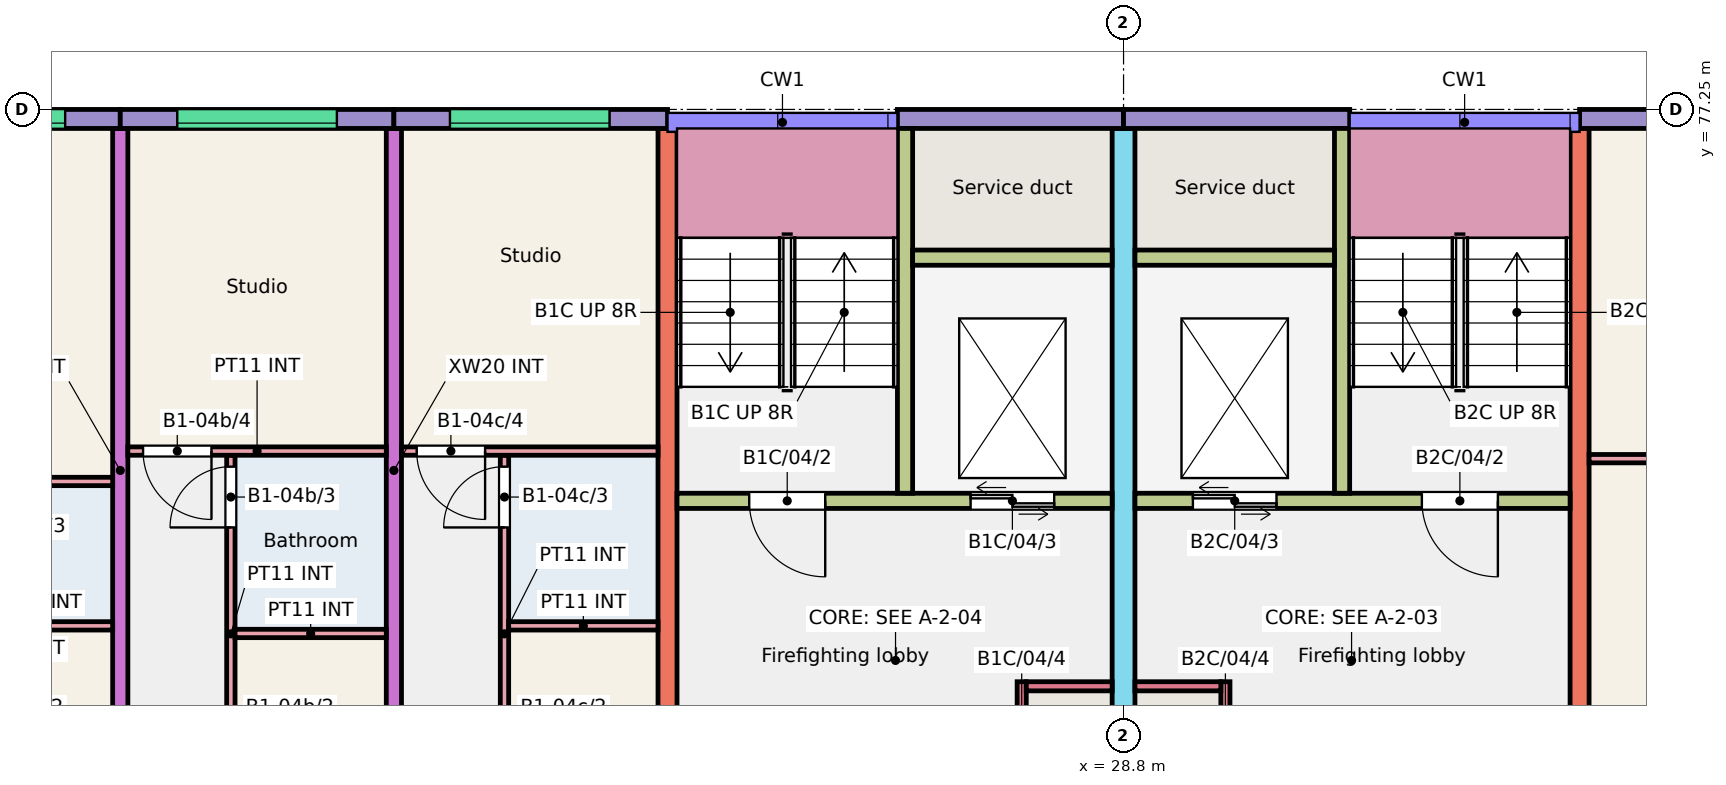
"""IFC4 building model, lengths in metres.
Left out: names, types, materials, properties, quantities, classifications, styles, units other than length and angle.
Written with IfcOpenShell. Run it as: python <this file> out.ifc"""

import sys

from ifc_helpers import new_model, si_unit, direction, frame, frame_2d, origin, place, context, subcontext, project, spatial, rectangle, extrude, element, fill, save


model = new_model("IFC4")
c1 = context("Model", 3, precision=1e-05, world=origin(), true_north=direction((0.0, 1.0)))
c2 = subcontext(c1, "Body", "Model", "MODEL_VIEW")
j1 = project(units=[si_unit("LENGTHUNIT", "METRE"), si_unit("PLANEANGLEUNIT", "RADIAN")], contexts=[c1])
p1 = place(None, origin())
s1 = spatial("IfcSite", under=j1, at=p1, CompositionType="ELEMENT")
p2 = place(p1, origin())
s2 = spatial("IfcBuilding", under=s1, at=p2, CompositionType="ELEMENT")
p3 = place(p2, frame((0.0, 0.0, 12.0)))
s3 = spatial("IfcBuildingStorey", under=s2, at=p3, CompositionType="ELEMENT", Elevation=12.0)
for number, where, z_axis, x_axis in (
    (1, (15.6, 68.0, 0.0), (0.0, 0.0, 1.0), (0.0, 1.0, 0.0)),
    (2, (19.2, 68.0, 0.0), (0.0, 0.0, 1.0), (0.0, 1.0, 0.0)),
):
    element("IfcWall", number, at=place(p3, frame(where, z_axis=z_axis, x_axis=x_axis)), inside=s3, PredefinedType="SHEAR", context=c2, shape_type="SweptSolid", body=[
        extrude(rectangle(XDim=9.0, YDim=0.2, at=frame_2d((4.5, 0.0))), origin(), (0.0, 0.0, 1.0), 3.0),
    ])
p4 = place(p3, frame((22.8, 68.0, 0.0), z_axis=(0.0, 0.0, 1.0), x_axis=(0.0, 1.0, 0.0)))
e3 = element("IfcWall", 3, at=p4, inside=s3, PredefinedType="SHEAR", context=c2, shape_type="SweptSolid", body=[
    extrude(rectangle(XDim=9.0, YDim=0.25, at=frame_2d((4.5, 0.0))), origin(), (0.0, 0.0, 1.0), 3.0),
])
p5 = place(p3, frame((28.8, 66.0, 0.0), z_axis=(0.0, 0.0, 1.0), x_axis=(0.0, 1.0, 0.0)))
e4 = element("IfcWall", 4, at=p5, inside=s3, PredefinedType="SHEAR", context=c2, shape_type="SweptSolid", body=[
    extrude(rectangle(XDim=11.0, YDim=0.3, at=frame_2d((5.5, 0.0))), origin(), (0.0, 0.0, 1.0), 3.0),
])
p6 = place(p5, frame((0.3, 0.0, 0.0)))
e5 = element("IfcOpeningElement", 5, at=p6, cuts=e4, PredefinedType="OPENING", context=c2, shape_type="SweptSolid", body=[
    extrude(rectangle(XDim=1.2, YDim=2.1, at=frame_2d((0.6, 1.05))), frame((0.0, 0.16, 0.0), z_axis=(0.0, -1.0, 0.0), x_axis=(1.0, 0.0, 0.0)), (0.0, 0.0, 1.0), 0.32),
])
p7 = place(p3, frame((34.8, 68.0, 0.0), z_axis=(0.0, 0.0, 1.0), x_axis=(0.0, 1.0, 0.0)))
e6 = element("IfcWall", 6, at=p7, inside=s3, PredefinedType="SHEAR", context=c2, shape_type="SweptSolid", body=[
    extrude(rectangle(XDim=9.0, YDim=0.25, at=frame_2d((4.5, 0.0))), origin(), (0.0, 0.0, 1.0), 3.0),
])
p8 = place(p3, frame((11.85, 77.125, 0.0), z_axis=(0.0, 0.0, 1.0), x_axis=(1.0, 0.0, 0.0)))
e7 = element("IfcWall", 7, at=p8, inside=s3, PredefinedType="SOLIDWALL", context=c2, shape_type="SweptSolid", body=[
    extrude(rectangle(XDim=3.75, YDim=0.25, at=frame_2d((1.875, 0.0))), origin(), (0.0, 0.0, 1.0), 3.0),
])
p9 = place(p8, frame((0.925, 0.0, 1.2)))
e8 = element("IfcOpeningElement", 8, at=p9, cuts=e7, PredefinedType="OPENING", context=c2, shape_type="SweptSolid", body=[
    extrude(rectangle(XDim=2.1, YDim=1.2, at=frame_2d((1.05, 0.6))), frame((0.0, 0.135, 0.0), z_axis=(0.0, -1.0, 0.0), x_axis=(1.0, 0.0, 0.0)), (0.0, 0.0, 1.0), 0.27),
])
p10 = place(p3, frame((15.6, 77.125, 0.0), z_axis=(0.0, 0.0, 1.0), x_axis=(1.0, 0.0, 0.0)))
e9 = element("IfcWall", 9, at=p10, inside=s3, PredefinedType="SOLIDWALL", context=c2, shape_type="SweptSolid", body=[
    extrude(rectangle(XDim=3.6, YDim=0.25, at=frame_2d((1.8, 0.0))), origin(), (0.0, 0.0, 1.0), 3.0),
])
p11 = place(p10, frame((0.75, 0.0, 1.2)))
e10 = element("IfcOpeningElement", 10, at=p11, cuts=e9, PredefinedType="OPENING", context=c2, shape_type="SweptSolid", body=[
    extrude(rectangle(XDim=2.1, YDim=1.2, at=frame_2d((1.05, 0.6))), frame((0.0, 0.135, 0.0), z_axis=(0.0, -1.0, 0.0), x_axis=(1.0, 0.0, 0.0)), (0.0, 0.0, 1.0), 0.27),
])
p12 = place(p3, frame((19.2, 77.125, 0.0), z_axis=(0.0, 0.0, 1.0), x_axis=(1.0, 0.0, 0.0)))
e11 = element("IfcWall", 11, at=p12, inside=s3, PredefinedType="SOLIDWALL", context=c2, shape_type="SweptSolid", body=[
    extrude(rectangle(XDim=3.6, YDim=0.25, at=frame_2d((1.8, 0.0))), origin(), (0.0, 0.0, 1.0), 3.0),
])
p13 = place(p12, frame((0.738, 0.0, 1.2)))
e12 = element("IfcOpeningElement", 12, at=p13, cuts=e11, PredefinedType="OPENING", context=c2, shape_type="SweptSolid", body=[
    extrude(rectangle(XDim=2.1, YDim=1.2, at=frame_2d((1.05, 0.6))), frame((0.0, 0.135, 0.0), z_axis=(0.0, -1.0, 0.0), x_axis=(1.0, 0.0, 0.0)), (0.0, 0.0, 1.0), 0.27),
])
p14 = place(p3, frame((25.825, 77.125, 0.0), z_axis=(0.0, 0.0, 1.0), x_axis=(1.0, 0.0, 0.0)))
e13 = element("IfcWall", 13, at=p14, inside=s3, PredefinedType="SOLIDWALL", context=c2, shape_type="SweptSolid", body=[
    extrude(rectangle(XDim=2.975, YDim=0.25, at=frame_2d((1.488, 0.0))), origin(), (0.0, 0.0, 1.0), 3.0),
])
p15 = place(p3, frame((22.925, 72.1, 0.0), z_axis=(0.0, 0.0, 1.0), x_axis=(1.0, 0.0, 0.0)))
e14 = element("IfcWall", 14, at=p15, inside=s3, PredefinedType="SHEAR", context=c2, shape_type="SweptSolid", body=[
    extrude(rectangle(XDim=5.725, YDim=0.2, at=frame_2d((2.862, 0.0))), origin(), (0.0, 0.0, 1.0), 3.0),
])
p16 = place(p15, frame((0.95, 0.0, 0.0)))
e15 = element("IfcOpeningElement", 15, at=p16, cuts=e14, PredefinedType="OPENING", context=c2, shape_type="SweptSolid", body=[
    extrude(rectangle(XDim=1.0, YDim=2.1, at=frame_2d((0.5, 1.05))), frame((0.0, 0.11, 0.0), z_axis=(0.0, -1.0, 0.0), x_axis=(1.0, 0.0, 0.0)), (0.0, 0.0, 1.0), 0.22),
])
p17 = place(p15, frame((3.863, 0.0, 0.0)))
e16 = element("IfcOpeningElement", 16, at=p17, cuts=e14, PredefinedType="OPENING", context=c2, shape_type="SweptSolid", body=[
    extrude(rectangle(XDim=1.1, YDim=2.1, at=frame_2d((0.55, 1.05))), frame((0.0, 0.11, 0.0), z_axis=(0.0, -1.0, 0.0), x_axis=(1.0, 0.0, 0.0)), (0.0, 0.0, 1.0), 0.22),
])
p18 = place(p3, frame((25.925, 72.2, 0.0), z_axis=(0.0, 0.0, 1.0), x_axis=(0.0, 1.0, 0.0)))
e17 = element("IfcWall", 17, at=p18, inside=s3, PredefinedType="SHEAR", context=c2, shape_type="SweptSolid", body=[
    extrude(rectangle(XDim=4.8, YDim=0.2, at=frame_2d((2.4, 0.0))), origin(), (0.0, 0.0, 1.0), 3.0),
])
p19 = place(p3, frame((26.025, 75.3, 0.0), z_axis=(0.0, 0.0, 1.0), x_axis=(1.0, 0.0, 0.0)))
e18 = element("IfcWall", 18, at=p19, inside=s3, PredefinedType="SHEAR", context=c2, shape_type="SweptSolid", body=[
    extrude(rectangle(XDim=2.625, YDim=0.2, at=frame_2d((1.312, 0.0))), origin(), (0.0, 0.0, 1.0), 3.0),
])
p20 = place(p3, frame((27.46, 68.0, 0.0), z_axis=(0.0, 0.0, 1.0), x_axis=(0.0, 1.0, 0.0)))
e19 = element("IfcWall", 19, at=p20, inside=s3, PredefinedType="SHEAR", context=c2, shape_type="SweptSolid", body=[
    extrude(rectangle(XDim=1.72, YDim=0.12, at=frame_2d((0.86, 0.0))), origin(), (0.0, 0.0, 1.0), 3.0),
])
p21 = place(p20, frame((0.45, 0.0, 0.0)))
e20 = element("IfcOpeningElement", 20, at=p21, cuts=e19, PredefinedType="OPENING", context=c2, shape_type="SweptSolid", body=[
    extrude(rectangle(XDim=0.9, YDim=2.1, at=frame_2d((0.45, 1.05))), frame((0.0, 0.07, 0.0), z_axis=(0.0, -1.0, 0.0), x_axis=(1.0, 0.0, 0.0)), (0.0, 0.0, 1.0), 0.14),
])
p22 = place(p3, frame((27.52, 69.66, 0.0), z_axis=(0.0, 0.0, 1.0), x_axis=(1.0, 0.0, 0.0)))
e21 = element("IfcWall", 21, at=p22, inside=s3, PredefinedType="SHEAR", context=c2, shape_type="SweptSolid", body=[
    extrude(rectangle(XDim=1.13, YDim=0.12, at=frame_2d((0.565, 0.0))), origin(), (0.0, 0.0, 1.0), 3.0),
])
p23 = place(p3, frame((28.8, 77.125, 0.0), z_axis=(0.0, 0.0, 1.0), x_axis=(1.0, 0.0, 0.0)))
e22 = element("IfcWall", 22, at=p23, inside=s3, PredefinedType="SOLIDWALL", context=c2, shape_type="SweptSolid", body=[
    extrude(rectangle(XDim=2.975, YDim=0.25, at=frame_2d((1.487, 0.0))), origin(), (0.0, 0.0, 1.0), 3.0),
])
p24 = place(p3, frame((28.95, 72.1, 0.0), z_axis=(0.0, 0.0, 1.0), x_axis=(1.0, 0.0, 0.0)))
e23 = element("IfcWall", 23, at=p24, inside=s3, PredefinedType="SHEAR", context=c2, shape_type="SweptSolid", body=[
    extrude(rectangle(XDim=5.725, YDim=0.2, at=frame_2d((2.863, 0.0))), origin(), (0.0, 0.0, 1.0), 3.0),
])
p25 = place(p24, frame((3.775, 0.0, 0.0)))
e24 = element("IfcOpeningElement", 24, at=p25, cuts=e23, PredefinedType="OPENING", context=c2, shape_type="SweptSolid", body=[
    extrude(rectangle(XDim=1.0, YDim=2.1, at=frame_2d((0.5, 1.05))), frame((0.0, 0.11, 0.0), z_axis=(0.0, -1.0, 0.0), x_axis=(1.0, 0.0, 0.0)), (0.0, 0.0, 1.0), 0.22),
])
p26 = place(p24, frame((0.762, 0.0, 0.0)))
e25 = element("IfcOpeningElement", 25, at=p26, cuts=e23, PredefinedType="OPENING", context=c2, shape_type="SweptSolid", body=[
    extrude(rectangle(XDim=1.1, YDim=2.1, at=frame_2d((0.55, 1.05))), frame((0.0, 0.11, 0.0), z_axis=(0.0, -1.0, 0.0), x_axis=(1.0, 0.0, 0.0)), (0.0, 0.0, 1.0), 0.22),
])
p27 = place(p3, frame((31.675, 72.2, 0.0), z_axis=(0.0, 0.0, 1.0), x_axis=(0.0, 1.0, 0.0)))
e26 = element("IfcWall", 26, at=p27, inside=s3, PredefinedType="SHEAR", context=c2, shape_type="SweptSolid", body=[
    extrude(rectangle(XDim=4.8, YDim=0.2, at=frame_2d((2.4, 0.0))), origin(), (0.0, 0.0, 1.0), 3.0),
])
p28 = place(p3, frame((28.95, 75.3, 0.0), z_axis=(0.0, 0.0, 1.0), x_axis=(1.0, 0.0, 0.0)))
e27 = element("IfcWall", 27, at=p28, inside=s3, PredefinedType="SHEAR", context=c2, shape_type="SweptSolid", body=[
    extrude(rectangle(XDim=2.625, YDim=0.2, at=frame_2d((1.312, 0.0))), origin(), (0.0, 0.0, 1.0), 3.0),
])
p29 = place(p3, frame((30.14, 68.0, 0.0), z_axis=(0.0, 0.0, 1.0), x_axis=(0.0, 1.0, 0.0)))
e28 = element("IfcWall", 28, at=p29, inside=s3, PredefinedType="SHEAR", context=c2, shape_type="SweptSolid", body=[
    extrude(rectangle(XDim=1.72, YDim=0.12, at=frame_2d((0.86, 0.0))), origin(), (0.0, 0.0, 1.0), 3.0),
])
p30 = place(p29, frame((0.45, 0.0, 0.0)))
e29 = element("IfcOpeningElement", 29, at=p30, cuts=e28, PredefinedType="OPENING", context=c2, shape_type="SweptSolid", body=[
    extrude(rectangle(XDim=0.9, YDim=2.1, at=frame_2d((0.45, 1.05))), frame((0.0, 0.07, 0.0), z_axis=(0.0, -1.0, 0.0), x_axis=(1.0, 0.0, 0.0)), (0.0, 0.0, 1.0), 0.14),
])
p31 = place(p3, frame((28.95, 69.66, 0.0), z_axis=(0.0, 0.0, 1.0), x_axis=(1.0, 0.0, 0.0)))
e30 = element("IfcWall", 30, at=p31, inside=s3, PredefinedType="SHEAR", context=c2, shape_type="SweptSolid", body=[
    extrude(rectangle(XDim=1.13, YDim=0.12, at=frame_2d((0.565, 0.0))), origin(), (0.0, 0.0, 1.0), 3.0),
])
p32 = place(p3, frame((34.8, 77.125, 0.0), z_axis=(0.0, 0.0, 1.0), x_axis=(1.0, 0.0, 0.0)))
e31 = element("IfcWall", 31, at=p32, inside=s3, PredefinedType="SOLIDWALL", context=c2, shape_type="SweptSolid", body=[
    extrude(rectangle(XDim=3.6, YDim=0.25, at=frame_2d((1.8, 0.0))), origin(), (0.0, 0.0, 1.0), 3.0),
])
p33 = place(p32, frame((1.212, 0.0, 1.1)))
e32 = element("IfcOpeningElement", 32, at=p33, cuts=e31, PredefinedType="OPENING", context=c2, shape_type="SweptSolid", body=[
    extrude(rectangle(XDim=1.2, YDim=1.3, at=frame_2d((0.6, 0.65))), frame((0.0, 0.135, 0.0), z_axis=(0.0, -1.0, 0.0), x_axis=(1.0, 0.0, 0.0)), (0.0, 0.0, 1.0), 0.27),
])
p34 = place(p3, frame((13.56, 70.455, 0.0), z_axis=(0.0, 0.0, 1.0), x_axis=(1.0, 0.0, 0.0)))
e33 = element("IfcWall", 33, at=p34, inside=s3, PredefinedType="PARTITIONING", context=c2, shape_type="SweptSolid", body=[
    extrude(rectangle(XDim=1.94, YDim=0.11, at=frame_2d((0.97, 0.0))), origin(), (0.0, 0.0, 1.0), 2.8),
])
p35 = place(p3, frame((12.15, 72.355, 0.0), z_axis=(0.0, 0.0, 1.0), x_axis=(1.0, 0.0, 0.0)))
e34 = element("IfcWall", 34, at=p35, inside=s3, PredefinedType="PARTITIONING", context=c2, shape_type="SweptSolid", body=[
    extrude(rectangle(XDim=3.35, YDim=0.11, at=frame_2d((1.675, 0.0))), origin(), (0.0, 0.0, 1.0), 2.8),
])
p36 = place(p35, frame((0.2, 0.0, 0.0)))
e35 = element("IfcOpeningElement", 35, at=p36, cuts=e34, PredefinedType="OPENING", context=c2, shape_type="SweptSolid", body=[
    extrude(rectangle(XDim=0.9, YDim=2.1, at=frame_2d((0.45, 1.05))), frame((0.0, 0.065, 0.0), z_axis=(0.0, -1.0, 0.0), x_axis=(1.0, 0.0, 0.0)), (0.0, 0.0, 1.0), 0.13),
])
p37 = place(p3, frame((17.055, 68.0, 0.0), z_axis=(0.0, 0.0, 1.0), x_axis=(0.0, 1.0, 0.0)))
e36 = element("IfcWall", 36, at=p37, inside=s3, PredefinedType="PARTITIONING", context=c2, shape_type="SweptSolid", body=[
    extrude(rectangle(XDim=4.7, YDim=0.11, at=frame_2d((2.35, 0.0))), origin(), (0.0, 0.0, 1.0), 2.8),
])
p38 = place(p37, frame((0.2, 0.0, 0.0)))
e37 = element("IfcOpeningElement", 37, at=p38, cuts=e36, PredefinedType="OPENING", context=c2, shape_type="SweptSolid", body=[
    extrude(rectangle(XDim=0.8, YDim=2.1, at=frame_2d((0.4, 1.05))), frame((0.0, 0.065, 0.0), z_axis=(0.0, -1.0, 0.0), x_axis=(1.0, 0.0, 0.0)), (0.0, 0.0, 1.0), 0.13),
])
p39 = place(p37, frame((3.75, 0.0, 0.0)))
e38 = element("IfcOpeningElement", 38, at=p39, cuts=e36, PredefinedType="OPENING", context=c2, shape_type="SweptSolid", body=[
    extrude(rectangle(XDim=0.8, YDim=2.1, at=frame_2d((0.4, 1.05))), frame((0.0, 0.065, 0.0), z_axis=(0.0, -1.0, 0.0), x_axis=(1.0, 0.0, 0.0)), (0.0, 0.0, 1.0), 0.13),
])
p40 = place(p3, frame((17.11, 70.355, 0.0), z_axis=(0.0, 0.0, 1.0), x_axis=(1.0, 0.0, 0.0)))
e39 = element("IfcWall", 39, at=p40, inside=s3, PredefinedType="PARTITIONING", context=c2, shape_type="SweptSolid", body=[
    extrude(rectangle(XDim=1.99, YDim=0.11, at=frame_2d((0.995, 0.0))), origin(), (0.0, 0.0, 1.0), 2.8),
])
p41 = place(p3, frame((15.7, 72.755, 0.0), z_axis=(0.0, 0.0, 1.0), x_axis=(1.0, 0.0, 0.0)))
e40 = element("IfcWall", 40, at=p41, inside=s3, PredefinedType="PARTITIONING", context=c2, shape_type="SweptSolid", body=[
    extrude(rectangle(XDim=3.4, YDim=0.11, at=frame_2d((1.7, 0.0))), origin(), (0.0, 0.0, 1.0), 2.8),
])
p42 = place(p41, frame((0.2, 0.0, 0.0)))
e41 = element("IfcOpeningElement", 41, at=p42, cuts=e40, PredefinedType="OPENING", context=c2, shape_type="SweptSolid", body=[
    extrude(rectangle(XDim=0.9, YDim=2.1, at=frame_2d((0.45, 1.05))), frame((0.0, 0.065, 0.0), z_axis=(0.0, -1.0, 0.0), x_axis=(1.0, 0.0, 0.0)), (0.0, 0.0, 1.0), 0.13),
])
p43 = place(p3, frame((20.655, 68.0, 0.0), z_axis=(0.0, 0.0, 1.0), x_axis=(0.0, 1.0, 0.0)))
e42 = element("IfcWall", 42, at=p43, inside=s3, PredefinedType="PARTITIONING", context=c2, shape_type="SweptSolid", body=[
    extrude(rectangle(XDim=4.7, YDim=0.11, at=frame_2d((2.35, 0.0))), origin(), (0.0, 0.0, 1.0), 2.8),
])
p44 = place(p43, frame((0.2, 0.0, 0.0)))
e43 = element("IfcOpeningElement", 43, at=p44, cuts=e42, PredefinedType="OPENING", context=c2, shape_type="SweptSolid", body=[
    extrude(rectangle(XDim=0.8, YDim=2.1, at=frame_2d((0.4, 1.05))), frame((0.0, 0.065, 0.0), z_axis=(0.0, -1.0, 0.0), x_axis=(1.0, 0.0, 0.0)), (0.0, 0.0, 1.0), 0.13),
])
p45 = place(p43, frame((3.75, 0.0, 0.0)))
e44 = element("IfcOpeningElement", 44, at=p45, cuts=e42, PredefinedType="OPENING", context=c2, shape_type="SweptSolid", body=[
    extrude(rectangle(XDim=0.8, YDim=2.1, at=frame_2d((0.4, 1.05))), frame((0.0, 0.065, 0.0), z_axis=(0.0, -1.0, 0.0), x_axis=(1.0, 0.0, 0.0)), (0.0, 0.0, 1.0), 0.13),
])
p46 = place(p3, frame((20.71, 70.455, 0.0), z_axis=(0.0, 0.0, 1.0), x_axis=(1.0, 0.0, 0.0)))
e45 = element("IfcWall", 45, at=p46, inside=s3, PredefinedType="PARTITIONING", context=c2, shape_type="SweptSolid", body=[
    extrude(rectangle(XDim=1.965, YDim=0.11, at=frame_2d((0.982, 0.0))), origin(), (0.0, 0.0, 1.0), 2.8),
])
p47 = place(p3, frame((19.3, 72.755, 0.0), z_axis=(0.0, 0.0, 1.0), x_axis=(1.0, 0.0, 0.0)))
e46 = element("IfcWall", 46, at=p47, inside=s3, PredefinedType="PARTITIONING", context=c2, shape_type="SweptSolid", body=[
    extrude(rectangle(XDim=3.375, YDim=0.11, at=frame_2d((1.688, 0.0))), origin(), (0.0, 0.0, 1.0), 2.8),
])
p48 = place(p47, frame((0.2, 0.0, 0.0)))
e47 = element("IfcOpeningElement", 47, at=p48, cuts=e46, PredefinedType="OPENING", context=c2, shape_type="SweptSolid", body=[
    extrude(rectangle(XDim=0.9, YDim=2.1, at=frame_2d((0.45, 1.05))), frame((0.0, 0.065, 0.0), z_axis=(0.0, -1.0, 0.0), x_axis=(1.0, 0.0, 0.0)), (0.0, 0.0, 1.0), 0.13),
])
p49 = place(p3, frame((34.925, 72.655, 0.0), z_axis=(0.0, 0.0, 1.0), x_axis=(1.0, 0.0, 0.0)))
e48 = element("IfcWall", 48, at=p49, inside=s3, PredefinedType="PARTITIONING", context=c2, shape_type="SweptSolid", body=[
    extrude(rectangle(XDim=3.375, YDim=0.11, at=frame_2d((1.688, 0.0))), origin(), (0.0, 0.0, 1.0), 2.8),
])
p50 = place(p9, origin())
e49 = element("IfcWindow", 49, at=p50, inside=s3, PartitioningType="SINGLE_PANEL", PredefinedType="WINDOW", context=c2, shape_type="SweptSolid", body=[
    extrude(rectangle(XDim=2.1, YDim=1.2, at=frame_2d((1.05, 0.6))), frame((0.0, -0.025, 0.0), z_axis=(0.0, -1.0, 0.0), x_axis=(1.0, 0.0, 0.0)), (0.0, 0.0, 1.0), 0.06),
])
fill(e8, e49)
p51 = place(p11, origin())
e50 = element("IfcWindow", 50, at=p51, inside=s3, PartitioningType="SINGLE_PANEL", PredefinedType="WINDOW", context=c2, shape_type="SweptSolid", body=[
    extrude(rectangle(XDim=2.1, YDim=1.2, at=frame_2d((1.05, 0.6))), frame((0.0, -0.025, 0.0), z_axis=(0.0, -1.0, 0.0), x_axis=(1.0, 0.0, 0.0)), (0.0, 0.0, 1.0), 0.06),
])
fill(e10, e50)
p52 = place(p13, origin())
e51 = element("IfcWindow", 51, at=p52, inside=s3, PartitioningType="SINGLE_PANEL", PredefinedType="WINDOW", context=c2, shape_type="SweptSolid", body=[
    extrude(rectangle(XDim=2.1, YDim=1.2, at=frame_2d((1.05, 0.6))), frame((0.0, -0.025, 0.0), z_axis=(0.0, -1.0, 0.0), x_axis=(1.0, 0.0, 0.0)), (0.0, 0.0, 1.0), 0.06),
])
fill(e12, e51)
p53 = place(p39, origin())
e52 = element("IfcDoor", 52, at=p53, inside=s3, OperationType="SINGLE_SWING_LEFT", PredefinedType="DOOR", context=c2, shape_type="SweptSolid", body=[
    extrude(rectangle(XDim=0.8, YDim=2.1, at=frame_2d((0.4, 1.05))), frame((0.0, 0.025, 0.0), z_axis=(0.0, -1.0, 0.0), x_axis=(1.0, 0.0, 0.0)), (0.0, 0.0, 1.0), 0.05),
])
fill(e38, e52)
p54 = place(p42, origin())
e53 = element("IfcDoor", 53, at=p54, inside=s3, OperationType="SINGLE_SWING_RIGHT", PredefinedType="DOOR", context=c2, shape_type="SweptSolid", body=[
    extrude(rectangle(XDim=0.9, YDim=2.1, at=frame_2d((0.45, 1.05))), frame((0.0, 0.025, 0.0), z_axis=(0.0, -1.0, 0.0), x_axis=(1.0, 0.0, 0.0)), (0.0, 0.0, 1.0), 0.05),
])
fill(e41, e53)
p55 = place(p45, origin())
e54 = element("IfcDoor", 54, at=p55, inside=s3, OperationType="SINGLE_SWING_LEFT", PredefinedType="DOOR", context=c2, shape_type="SweptSolid", body=[
    extrude(rectangle(XDim=0.8, YDim=2.1, at=frame_2d((0.4, 1.05))), frame((0.0, 0.025, 0.0), z_axis=(0.0, -1.0, 0.0), x_axis=(1.0, 0.0, 0.0)), (0.0, 0.0, 1.0), 0.05),
])
fill(e44, e54)
p56 = place(p48, origin())
e55 = element("IfcDoor", 55, at=p56, inside=s3, OperationType="SINGLE_SWING_RIGHT", PredefinedType="DOOR", context=c2, shape_type="SweptSolid", body=[
    extrude(rectangle(XDim=0.9, YDim=2.1, at=frame_2d((0.45, 1.05))), frame((0.0, 0.025, 0.0), z_axis=(0.0, -1.0, 0.0), x_axis=(1.0, 0.0, 0.0)), (0.0, 0.0, 1.0), 0.05),
])
fill(e47, e55)
p57 = place(p16, origin())
e56 = element("IfcDoor", 56, at=p57, inside=s3, OperationType="SINGLE_SWING_RIGHT", PredefinedType="DOOR", context=c2, shape_type="SweptSolid", body=[
    extrude(rectangle(XDim=1.0, YDim=2.1, at=frame_2d((0.5, 1.05))), frame((0.0, 0.025, 0.0), z_axis=(0.0, -1.0, 0.0), x_axis=(1.0, 0.0, 0.0)), (0.0, 0.0, 1.0), 0.05),
])
fill(e15, e56)
p58 = place(p17, origin())
e57 = element("IfcDoor", 57, at=p58, inside=s3, OperationType="DOUBLE_DOOR_SLIDING", PredefinedType="DOOR", context=c2, shape_type="SweptSolid", body=[
    extrude(rectangle(XDim=1.1, YDim=2.1, at=frame_2d((0.55, 1.05))), frame((0.0, 0.025, 0.0), z_axis=(0.0, -1.0, 0.0), x_axis=(1.0, 0.0, 0.0)), (0.0, 0.0, 1.0), 0.05),
])
fill(e16, e57)
p59 = place(p25, origin())
e58 = element("IfcDoor", 58, at=p59, inside=s3, OperationType="SINGLE_SWING_RIGHT", PredefinedType="DOOR", context=c2, shape_type="SweptSolid", body=[
    extrude(rectangle(XDim=1.0, YDim=2.1, at=frame_2d((0.5, 1.05))), frame((0.0, 0.025, 0.0), z_axis=(0.0, -1.0, 0.0), x_axis=(1.0, 0.0, 0.0)), (0.0, 0.0, 1.0), 0.05),
])
fill(e24, e58)
p60 = place(p26, origin())
e59 = element("IfcDoor", 59, at=p60, inside=s3, OperationType="DOUBLE_DOOR_SLIDING", PredefinedType="DOOR", context=c2, shape_type="SweptSolid", body=[
    extrude(rectangle(XDim=1.1, YDim=2.1, at=frame_2d((0.55, 1.05))), frame((0.0, 0.025, 0.0), z_axis=(0.0, -1.0, 0.0), x_axis=(1.0, 0.0, 0.0)), (0.0, 0.0, 1.0), 0.05),
])
fill(e25, e59)
save(model, sys.argv[1])
